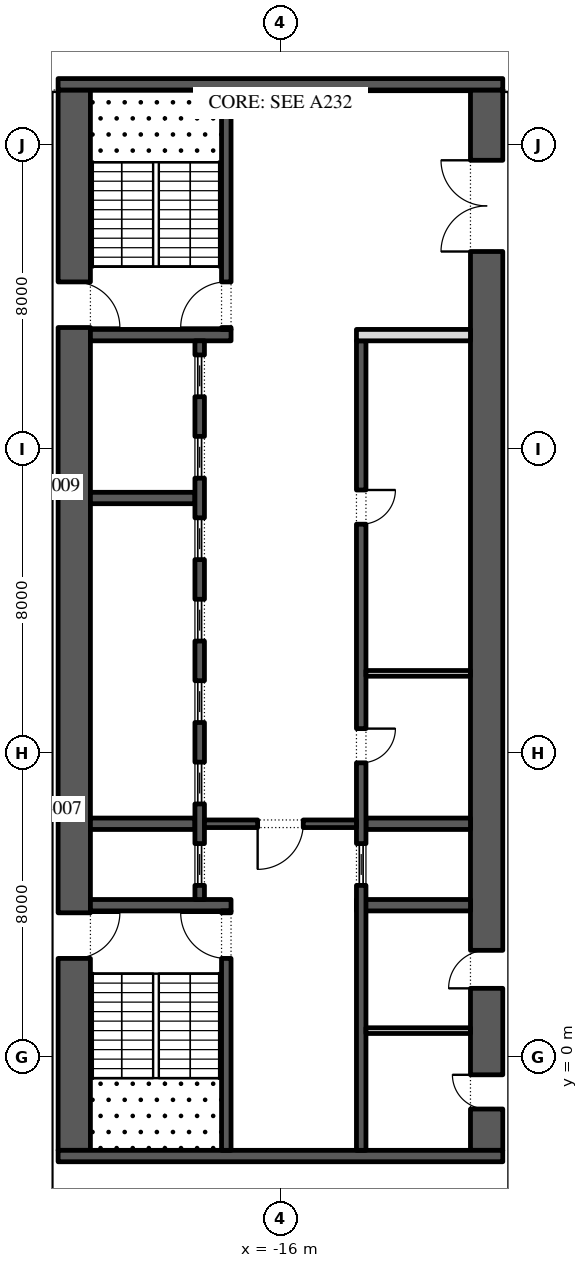
"""IFC4 building model, lengths in metres.
Left out: names, types, materials, properties, quantities, classifications, styles, units other than length and angle.
Written with IfcOpenShell. Run it as: python <this file> out.ifc"""

import sys

from ifc_helpers import new_model, si_unit, direction, frame, frame_2d, origin, place, context, subcontext, project, spatial, rectangle, extrude, element, fill, save


model = new_model("IFC4")
c1 = context("Model", 3, precision=1e-05, world=origin(), true_north=direction((0.0, 1.0)))
c2 = subcontext(c1, "Body", "Model", "MODEL_VIEW")
j1 = project(units=[si_unit("LENGTHUNIT", "METRE"), si_unit("PLANEANGLEUNIT", "RADIAN")], contexts=[c1])
p1 = place(None, origin())
s1 = spatial("IfcSite", under=j1, at=p1, CompositionType="ELEMENT")
p2 = place(p1, origin())
s2 = spatial("IfcBuilding", under=s1, at=p2, CompositionType="ELEMENT")
p3 = place(p2, frame((0.0, 0.0, 135.0)))
s3 = spatial("IfcBuildingStorey", under=s2, at=p3, CompositionType="ELEMENT", Elevation=135.0)
p4 = place(p3, frame((-21.425, -2.45, 0.0), z_axis=(0.0, 0.0, 1.0), x_axis=(0.0, 1.0, 0.0)))
e1 = element("IfcWall", 1, at=p4, inside=s3, PredefinedType="SHEAR", context=c2, shape_type="SweptSolid", body=[
    extrude(rectangle(XDim=27.9, YDim=0.85, at=frame_2d((13.95, 0.0))), origin(), (0.0, 0.0, 1.0), 4.0),
])
p5 = place(p4, frame((5.05, 0.0, 0.0)))
e2 = element("IfcOpeningElement", 2, at=p5, cuts=e1, PredefinedType="OPENING", context=c2, shape_type="SweptSolid", body=[
    extrude(rectangle(XDim=1.2, YDim=2.1, at=frame_2d((0.6, 1.05))), frame((0.0, 0.435, 0.0), z_axis=(0.0, -1.0, 0.0), x_axis=(1.0, 0.0, 0.0)), (0.0, 0.0, 1.0), 0.87),
])
p6 = place(p4, frame((21.65, 0.0, 0.0)))
e3 = element("IfcOpeningElement", 3, at=p6, cuts=e1, PredefinedType="OPENING", context=c2, shape_type="SweptSolid", body=[
    extrude(rectangle(XDim=1.2, YDim=2.1, at=frame_2d((0.6, 1.05))), frame((0.0, 0.435, 0.0), z_axis=(0.0, -1.0, 0.0), x_axis=(1.0, 0.0, 0.0)), (0.0, 0.0, 1.0), 0.87),
])
p7 = place(p3, frame((-10.575, -2.45, 0.0), z_axis=(0.0, 0.0, 1.0), x_axis=(0.0, 1.0, 0.0)))
e4 = element("IfcWall", 4, at=p7, inside=s3, PredefinedType="SHEAR", context=c2, shape_type="SweptSolid", body=[
    extrude(rectangle(XDim=27.9, YDim=0.85, at=frame_2d((13.95, 0.0))), origin(), (0.0, 0.0, 1.0), 4.0),
])
p8 = place(p7, frame((23.65, 0.0, 0.0)))
e5 = element("IfcOpeningElement", 5, at=p8, cuts=e4, PredefinedType="OPENING", context=c2, shape_type="SweptSolid", body=[
    extrude(rectangle(XDim=2.4, YDim=2.1, at=frame_2d((1.2, 1.05))), frame((0.0, 0.435, 0.0), z_axis=(0.0, -1.0, 0.0), x_axis=(1.0, 0.0, 0.0)), (0.0, 0.0, 1.0), 0.87),
])
p9 = place(p7, frame((1.087, 0.0, 0.0)))
e6 = element("IfcOpeningElement", 6, at=p9, cuts=e4, PredefinedType="OPENING", context=c2, shape_type="SweptSolid", body=[
    extrude(rectangle(XDim=0.9, YDim=2.1, at=frame_2d((0.45, 1.05))), frame((0.0, 0.435, 0.0), z_axis=(0.0, -1.0, 0.0), x_axis=(1.0, 0.0, 0.0)), (0.0, 0.0, 1.0), 0.87),
])
p10 = place(p7, frame((4.262, 0.0, 0.0)))
e7 = element("IfcOpeningElement", 7, at=p10, cuts=e4, PredefinedType="OPENING", context=c2, shape_type="SweptSolid", body=[
    extrude(rectangle(XDim=1.0, YDim=2.1, at=frame_2d((0.5, 1.05))), frame((0.0, 0.435, 0.0), z_axis=(0.0, -1.0, 0.0), x_axis=(1.0, 0.0, 0.0)), (0.0, 0.0, 1.0), 0.87),
])
for number, where, z_axis, x_axis in (
    (8, (-21.85, -2.6, 0.0), (0.0, 0.0, 1.0), (1.0, 0.0, 0.0)),
    (9, (-21.85, 25.6, 0.0), (0.0, 0.0, 1.0), (1.0, 0.0, 0.0)),
):
    element("IfcWall", number, at=place(p3, frame(where, z_axis=z_axis, x_axis=x_axis)), inside=s3, PredefinedType="SHEAR", context=c2, shape_type="SweptSolid", body=[
        extrude(rectangle(XDim=11.7, YDim=0.3, at=frame_2d((5.85, 0.0))), origin(), (0.0, 0.0, 1.0), 4.0),
    ])
p11 = place(p3, frame((-21.0, 4.0, 0.0), z_axis=(0.0, 0.0, 1.0), x_axis=(1.0, 0.0, 0.0)))
e10 = element("IfcWall", 10, at=p11, inside=s3, PredefinedType="SHEAR", context=c2, shape_type="SweptSolid", body=[
    extrude(rectangle(XDim=3.7, YDim=0.3, at=frame_2d((1.85, 0.0))), origin(), (0.0, 0.0, 1.0), 4.0),
])
p12 = place(p3, frame((-17.425, -2.45, 0.0), z_axis=(0.0, 0.0, 1.0), x_axis=(0.0, 1.0, 0.0)))
e11 = element("IfcWall", 11, at=p12, inside=s3, PredefinedType="SHEAR", context=c2, shape_type="SweptSolid", body=[
    extrude(rectangle(XDim=6.3, YDim=0.25, at=frame_2d((3.15, 0.0))), origin(), (0.0, 0.0, 1.0), 4.0),
])
p13 = place(p12, frame((5.05, 0.0, 0.0)))
e12 = element("IfcOpeningElement", 12, at=p13, cuts=e11, PredefinedType="OPENING", context=c2, shape_type="SweptSolid", body=[
    extrude(rectangle(XDim=1.2, YDim=2.1, at=frame_2d((0.6, 1.05))), frame((0.0, 0.135, 0.0), z_axis=(0.0, -1.0, 0.0), x_axis=(1.0, 0.0, 0.0)), (0.0, 0.0, 1.0), 0.27),
])
p14 = place(p3, frame((-21.0, 19.0, 0.0), z_axis=(0.0, 0.0, 1.0), x_axis=(1.0, 0.0, 0.0)))
e13 = element("IfcWall", 13, at=p14, inside=s3, PredefinedType="SHEAR", context=c2, shape_type="SweptSolid", body=[
    extrude(rectangle(XDim=3.7, YDim=0.3, at=frame_2d((1.85, 0.0))), origin(), (0.0, 0.0, 1.0), 4.0),
])
p15 = place(p3, frame((-17.425, 19.15, 0.0), z_axis=(0.0, 0.0, 1.0), x_axis=(0.0, 1.0, 0.0)))
e14 = element("IfcWall", 14, at=p15, inside=s3, PredefinedType="SHEAR", context=c2, shape_type="SweptSolid", body=[
    extrude(rectangle(XDim=6.3, YDim=0.25, at=frame_2d((3.15, 0.0))), origin(), (0.0, 0.0, 1.0), 4.0),
])
p16 = place(p15, frame((0.05, 0.0, 0.0)))
e15 = element("IfcOpeningElement", 15, at=p16, cuts=e14, PredefinedType="OPENING", context=c2, shape_type="SweptSolid", body=[
    extrude(rectangle(XDim=1.2, YDim=2.1, at=frame_2d((0.6, 1.05))), frame((0.0, 0.135, 0.0), z_axis=(0.0, -1.0, 0.0), x_axis=(1.0, 0.0, 0.0)), (0.0, 0.0, 1.0), 0.27),
])
for number, where, z_axis, x_axis in (
    (16, (-21.0, 6.143, 0.0), (0.0, 0.0, 1.0), (1.0, 0.0, 0.0)),
    (17, (-21.0, 14.714, 0.0), (0.0, 0.0, 1.0), (1.0, 0.0, 0.0)),
):
    element("IfcWall", number, at=place(p3, frame(where, z_axis=z_axis, x_axis=x_axis)), inside=s3, PredefinedType="SHEAR", context=c2, shape_type="SweptSolid", body=[
        extrude(rectangle(XDim=2.75, YDim=0.3, at=frame_2d((1.375, 0.0))), origin(), (0.0, 0.0, 1.0), 4.0),
    ])
p17 = place(p3, frame((-18.125, 4.15, 0.0), z_axis=(0.0, 0.0, 1.0), x_axis=(0.0, 1.0, 0.0)))
e18 = element("IfcWall", 18, at=p17, inside=s3, PredefinedType="SHEAR", context=c2, shape_type="SweptSolid", body=[
    extrude(rectangle(XDim=14.7, YDim=0.25, at=frame_2d((7.35, 0.0))), origin(), (0.0, 0.0, 1.0), 4.0),
])
p18 = place(p17, frame((0.371, 0.0, 0.0)))
e19 = element("IfcOpeningElement", 19, at=p18, cuts=e18, PredefinedType="OPENING", context=c2, shape_type="SweptSolid", body=[
    extrude(rectangle(XDim=1.1, YDim=2.1, at=frame_2d((0.55, 1.05))), frame((0.0, 0.135, 0.0), z_axis=(0.0, -1.0, 0.0), x_axis=(1.0, 0.0, 0.0)), (0.0, 0.0, 1.0), 0.27),
])
p19 = place(p17, frame((2.514, 0.0, 0.0)))
e20 = element("IfcOpeningElement", 20, at=p19, cuts=e18, PredefinedType="OPENING", context=c2, shape_type="SweptSolid", body=[
    extrude(rectangle(XDim=1.1, YDim=2.1, at=frame_2d((0.55, 1.05))), frame((0.0, 0.135, 0.0), z_axis=(0.0, -1.0, 0.0), x_axis=(1.0, 0.0, 0.0)), (0.0, 0.0, 1.0), 0.27),
])
p20 = place(p17, frame((4.657, 0.0, 0.0)))
e21 = element("IfcOpeningElement", 21, at=p20, cuts=e18, PredefinedType="OPENING", context=c2, shape_type="SweptSolid", body=[
    extrude(rectangle(XDim=1.1, YDim=2.1, at=frame_2d((0.55, 1.05))), frame((0.0, 0.135, 0.0), z_axis=(0.0, -1.0, 0.0), x_axis=(1.0, 0.0, 0.0)), (0.0, 0.0, 1.0), 0.27),
])
p21 = place(p17, frame((6.8, 0.0, 0.0)))
e22 = element("IfcOpeningElement", 22, at=p21, cuts=e18, PredefinedType="OPENING", context=c2, shape_type="SweptSolid", body=[
    extrude(rectangle(XDim=1.1, YDim=2.1, at=frame_2d((0.55, 1.05))), frame((0.0, 0.135, 0.0), z_axis=(0.0, -1.0, 0.0), x_axis=(1.0, 0.0, 0.0)), (0.0, 0.0, 1.0), 0.27),
])
p22 = place(p17, frame((8.943, 0.0, 0.0)))
e23 = element("IfcOpeningElement", 23, at=p22, cuts=e18, PredefinedType="OPENING", context=c2, shape_type="SweptSolid", body=[
    extrude(rectangle(XDim=1.1, YDim=2.1, at=frame_2d((0.55, 1.05))), frame((0.0, 0.135, 0.0), z_axis=(0.0, -1.0, 0.0), x_axis=(1.0, 0.0, 0.0)), (0.0, 0.0, 1.0), 0.27),
])
p23 = place(p17, frame((11.086, 0.0, 0.0)))
e24 = element("IfcOpeningElement", 24, at=p23, cuts=e18, PredefinedType="OPENING", context=c2, shape_type="SweptSolid", body=[
    extrude(rectangle(XDim=1.1, YDim=2.1, at=frame_2d((0.55, 1.05))), frame((0.0, 0.135, 0.0), z_axis=(0.0, -1.0, 0.0), x_axis=(1.0, 0.0, 0.0)), (0.0, 0.0, 1.0), 0.27),
])
p24 = place(p17, frame((13.229, 0.0, 0.0)))
e25 = element("IfcOpeningElement", 25, at=p24, cuts=e18, PredefinedType="OPENING", context=c2, shape_type="SweptSolid", body=[
    extrude(rectangle(XDim=1.1, YDim=2.1, at=frame_2d((0.55, 1.05))), frame((0.0, 0.135, 0.0), z_axis=(0.0, -1.0, 0.0), x_axis=(1.0, 0.0, 0.0)), (0.0, 0.0, 1.0), 0.27),
])
p25 = place(p3, frame((-14.0, 4.0, 0.0), z_axis=(0.0, 0.0, 1.0), x_axis=(1.0, 0.0, 0.0)))
e26 = element("IfcWall", 26, at=p25, inside=s3, PredefinedType="SHEAR", context=c2, shape_type="SweptSolid", body=[
    extrude(rectangle(XDim=3.0, YDim=0.3, at=frame_2d((1.5, 0.0))), origin(), (0.0, 0.0, 1.0), 4.0),
])
p26 = place(p3, frame((-13.75, 6.143, 0.0), z_axis=(0.0, 0.0, 1.0), x_axis=(1.0, 0.0, 0.0)))
e27 = element("IfcWall", 27, at=p26, inside=s3, PredefinedType="SHEAR", context=c2, shape_type="SweptSolid", body=[
    extrude(rectangle(XDim=2.75, YDim=0.3, at=frame_2d((1.375, 0.0))), origin(), (0.0, 0.0, 1.0), 4.0),
])
p27 = place(p3, frame((-13.875, -2.45, 0.0), z_axis=(0.0, 0.0, 1.0), x_axis=(0.0, 1.0, 0.0)))
e28 = element("IfcWall", 28, at=p27, inside=s3, PredefinedType="SHEAR", context=c2, shape_type="SweptSolid", body=[
    extrude(rectangle(XDim=21.3, YDim=0.25, at=frame_2d((10.65, 0.0))), origin(), (0.0, 0.0, 1.0), 4.0),
])
p28 = place(p27, frame((10.196, 0.0, 0.0)))
e29 = element("IfcOpeningElement", 29, at=p28, cuts=e28, PredefinedType="OPENING", context=c2, shape_type="SweptSolid", body=[
    extrude(rectangle(XDim=0.9, YDim=2.1, at=frame_2d((0.45, 1.05))), frame((0.0, 0.135, 0.0), z_axis=(0.0, -1.0, 0.0), x_axis=(1.0, 0.0, 0.0)), (0.0, 0.0, 1.0), 0.27),
])
p29 = place(p27, frame((16.475, 0.0, 0.0)))
e30 = element("IfcOpeningElement", 30, at=p29, cuts=e28, PredefinedType="OPENING", context=c2, shape_type="SweptSolid", body=[
    extrude(rectangle(XDim=0.9, YDim=2.1, at=frame_2d((0.45, 1.05))), frame((0.0, 0.135, 0.0), z_axis=(0.0, -1.0, 0.0), x_axis=(1.0, 0.0, 0.0)), (0.0, 0.0, 1.0), 0.27),
])
p30 = place(p27, frame((6.971, 0.0, 0.0)))
e31 = element("IfcOpeningElement", 31, at=p30, cuts=e28, PredefinedType="OPENING", context=c2, shape_type="SweptSolid", body=[
    extrude(rectangle(XDim=1.1, YDim=2.1, at=frame_2d((0.55, 1.05))), frame((0.0, 0.135, 0.0), z_axis=(0.0, -1.0, 0.0), x_axis=(1.0, 0.0, 0.0)), (0.0, 0.0, 1.0), 0.27),
])
p31 = place(p3, frame((-14.0, 19.0, 0.0), z_axis=(0.0, 0.0, 1.0), x_axis=(1.0, 0.0, 0.0)))
e32 = element("IfcWall", 32, at=p31, inside=s3, PredefinedType="PARTITIONING", context=c2, shape_type="SweptSolid", body=[
    extrude(rectangle(XDim=3.0, YDim=0.3, at=frame_2d((1.5, 0.0))), origin(), (0.0, 0.0, 1.0), 4.0),
])
p32 = place(p3, frame((-13.75, 10.1, 0.0), z_axis=(0.0, 0.0, 1.0), x_axis=(1.0, 0.0, 0.0)))
e33 = element("IfcWall", 33, at=p32, inside=s3, PredefinedType="PARTITIONING", context=c2, shape_type="SweptSolid", body=[
    extrude(rectangle(XDim=2.75, YDim=0.15, at=frame_2d((1.375, 0.0))), origin(), (0.0, 0.0, 1.0), 4.0),
])
p33 = place(p3, frame((-18.0, 6.143, 0.0), z_axis=(0.0, 0.0, 1.0), x_axis=(1.0, 0.0, 0.0)))
e34 = element("IfcWall", 34, at=p33, inside=s3, PredefinedType="SHEAR", context=c2, shape_type="SweptSolid", body=[
    extrude(rectangle(XDim=4.0, YDim=0.2, at=frame_2d((2.0, 0.0))), origin(), (0.0, 0.0, 1.0), 4.0),
])
p34 = place(p33, frame((1.4, 0.0, 0.0)))
e35 = element("IfcOpeningElement", 35, at=p34, cuts=e34, PredefinedType="OPENING", context=c2, shape_type="SweptSolid", body=[
    extrude(rectangle(XDim=1.2, YDim=2.1, at=frame_2d((0.6, 1.05))), frame((0.0, 0.11, 0.0), z_axis=(0.0, -1.0, 0.0), x_axis=(1.0, 0.0, 0.0)), (0.0, 0.0, 1.0), 0.22),
])
p35 = place(p3, frame((-13.75, 0.7, 0.0), z_axis=(0.0, 0.0, 1.0), x_axis=(1.0, 0.0, 0.0)))
e36 = element("IfcWall", 36, at=p35, inside=s3, PredefinedType="PARTITIONING", context=c2, shape_type="SweptSolid", body=[
    extrude(rectangle(XDim=2.75, YDim=0.15, at=frame_2d((1.375, 0.0))), origin(), (0.0, 0.0, 1.0), 4.0),
])
p36 = place(p18, origin())
e37 = element("IfcDoor", 37, at=p36, inside=s3, OperationType="SLIDING_TO_LEFT", PredefinedType="DOOR", context=c2, shape_type="SweptSolid", body=[
    extrude(rectangle(XDim=1.1, YDim=2.1, at=frame_2d((0.55, 1.05))), frame((0.0, 0.025, 0.0), z_axis=(0.0, -1.0, 0.0), x_axis=(1.0, 0.0, 0.0)), (0.0, 0.0, 1.0), 0.05),
])
fill(e19, e37)
p37 = place(p19, origin())
e38 = element("IfcDoor", 38, at=p37, inside=s3, OperationType="SLIDING_TO_LEFT", PredefinedType="DOOR", context=c2, shape_type="SweptSolid", body=[
    extrude(rectangle(XDim=1.1, YDim=2.1, at=frame_2d((0.55, 1.05))), frame((0.0, 0.025, 0.0), z_axis=(0.0, -1.0, 0.0), x_axis=(1.0, 0.0, 0.0)), (0.0, 0.0, 1.0), 0.05),
])
fill(e20, e38)
p38 = place(p20, origin())
e39 = element("IfcDoor", 39, at=p38, inside=s3, OperationType="SLIDING_TO_LEFT", PredefinedType="DOOR", context=c2, shape_type="SweptSolid", body=[
    extrude(rectangle(XDim=1.1, YDim=2.1, at=frame_2d((0.55, 1.05))), frame((0.0, 0.025, 0.0), z_axis=(0.0, -1.0, 0.0), x_axis=(1.0, 0.0, 0.0)), (0.0, 0.0, 1.0), 0.05),
])
fill(e21, e39)
p39 = place(p21, origin())
e40 = element("IfcDoor", 40, at=p39, inside=s3, OperationType="SLIDING_TO_LEFT", PredefinedType="DOOR", context=c2, shape_type="SweptSolid", body=[
    extrude(rectangle(XDim=1.1, YDim=2.1, at=frame_2d((0.55, 1.05))), frame((0.0, 0.025, 0.0), z_axis=(0.0, -1.0, 0.0), x_axis=(1.0, 0.0, 0.0)), (0.0, 0.0, 1.0), 0.05),
])
fill(e22, e40)
p40 = place(p22, origin())
e41 = element("IfcDoor", 41, at=p40, inside=s3, OperationType="SLIDING_TO_LEFT", PredefinedType="DOOR", context=c2, shape_type="SweptSolid", body=[
    extrude(rectangle(XDim=1.1, YDim=2.1, at=frame_2d((0.55, 1.05))), frame((0.0, 0.025, 0.0), z_axis=(0.0, -1.0, 0.0), x_axis=(1.0, 0.0, 0.0)), (0.0, 0.0, 1.0), 0.05),
])
fill(e23, e41)
p41 = place(p23, origin())
e42 = element("IfcDoor", 42, at=p41, inside=s3, OperationType="SLIDING_TO_LEFT", PredefinedType="DOOR", context=c2, shape_type="SweptSolid", body=[
    extrude(rectangle(XDim=1.1, YDim=2.1, at=frame_2d((0.55, 1.05))), frame((0.0, 0.025, 0.0), z_axis=(0.0, -1.0, 0.0), x_axis=(1.0, 0.0, 0.0)), (0.0, 0.0, 1.0), 0.05),
])
fill(e24, e42)
p42 = place(p24, origin())
e43 = element("IfcDoor", 43, at=p42, inside=s3, OperationType="SLIDING_TO_LEFT", PredefinedType="DOOR", context=c2, shape_type="SweptSolid", body=[
    extrude(rectangle(XDim=1.1, YDim=2.1, at=frame_2d((0.55, 1.05))), frame((0.0, 0.025, 0.0), z_axis=(0.0, -1.0, 0.0), x_axis=(1.0, 0.0, 0.0)), (0.0, 0.0, 1.0), 0.05),
])
fill(e25, e43)
p43 = place(p28, frame((0.9, -0.2, 0.0), z_axis=(0.0, 0.0, 1.0), x_axis=(-1.0, 0.0, 0.0)))
e44 = element("IfcDoor", 44, at=p43, inside=s3, OperationType="SINGLE_SWING_RIGHT", PredefinedType="DOOR", context=c2, shape_type="SweptSolid", body=[
    extrude(rectangle(XDim=0.9, YDim=2.1, at=frame_2d((0.45, 1.05))), frame((0.0, -0.075, 0.0), z_axis=(0.0, -1.0, 0.0), x_axis=(1.0, 0.0, 0.0)), (0.0, 0.0, 1.0), 0.05),
])
fill(e29, e44)
p44 = place(p29, frame((0.9, -0.2, 0.0), z_axis=(0.0, 0.0, 1.0), x_axis=(-1.0, 0.0, 0.0)))
e45 = element("IfcDoor", 45, at=p44, inside=s3, OperationType="SINGLE_SWING_RIGHT", PredefinedType="DOOR", context=c2, shape_type="SweptSolid", body=[
    extrude(rectangle(XDim=0.9, YDim=2.1, at=frame_2d((0.45, 1.05))), frame((0.0, -0.075, 0.0), z_axis=(0.0, -1.0, 0.0), x_axis=(1.0, 0.0, 0.0)), (0.0, 0.0, 1.0), 0.05),
])
fill(e30, e45)
p45 = place(p30, origin())
e46 = element("IfcDoor", 46, at=p45, inside=s3, OperationType="SLIDING_TO_LEFT", PredefinedType="DOOR", context=c2, shape_type="SweptSolid", body=[
    extrude(rectangle(XDim=1.1, YDim=2.1, at=frame_2d((0.55, 1.05))), frame((0.0, 0.025, 0.0), z_axis=(0.0, -1.0, 0.0), x_axis=(1.0, 0.0, 0.0)), (0.0, 0.0, 1.0), 0.05),
])
fill(e31, e46)
p46 = place(p34, frame((1.2, 0.0, 0.0), z_axis=(0.0, 0.0, 1.0), x_axis=(-1.0, 0.0, 0.0)))
e47 = element("IfcDoor", 47, at=p46, inside=s3, OperationType="SINGLE_SWING_LEFT", PredefinedType="DOOR", context=c2, shape_type="SweptSolid", body=[
    extrude(rectangle(XDim=1.2, YDim=2.1, at=frame_2d((0.6, 1.05))), frame((0.0, 0.025, 0.0), z_axis=(0.0, -1.0, 0.0), x_axis=(1.0, 0.0, 0.0)), (0.0, 0.0, 1.0), 0.05),
])
fill(e35, e47)
p47 = place(p8, origin())
e48 = element("IfcDoor", 48, at=p47, inside=s3, OperationType="DOUBLE_DOOR_SINGLE_SWING", PredefinedType="DOOR", context=c2, shape_type="SweptSolid", body=[
    extrude(rectangle(XDim=2.4, YDim=2.1, at=frame_2d((1.2, 1.05))), frame((0.0, 0.025, 0.0), z_axis=(0.0, -1.0, 0.0), x_axis=(1.0, 0.0, 0.0)), (0.0, 0.0, 1.0), 0.05),
])
fill(e5, e48)
p48 = place(p13, origin())
e49 = element("IfcDoor", 49, at=p48, inside=s3, OperationType="SINGLE_SWING_LEFT", PredefinedType="DOOR", context=c2, shape_type="SweptSolid", body=[
    extrude(rectangle(XDim=1.2, YDim=2.1, at=frame_2d((0.6, 1.05))), frame((0.0, 0.025, 0.0), z_axis=(0.0, -1.0, 0.0), x_axis=(1.0, 0.0, 0.0)), (0.0, 0.0, 1.0), 0.05),
])
fill(e12, e49)
p49 = place(p5, frame((1.2, 0.0, 0.0), z_axis=(0.0, 0.0, 1.0), x_axis=(-1.0, 0.0, 0.0)))
e50 = element("IfcDoor", 50, at=p49, inside=s3, OperationType="SINGLE_SWING_RIGHT", PredefinedType="DOOR", context=c2, shape_type="SweptSolid", body=[
    extrude(rectangle(XDim=1.2, YDim=2.1, at=frame_2d((0.6, 1.05))), frame((0.0, 0.025, 0.0), z_axis=(0.0, -1.0, 0.0), x_axis=(1.0, 0.0, 0.0)), (0.0, 0.0, 1.0), 0.05),
])
fill(e2, e50)
p50 = place(p16, origin())
e51 = element("IfcDoor", 51, at=p50, inside=s3, OperationType="SINGLE_SWING_RIGHT", PredefinedType="DOOR", context=c2, shape_type="SweptSolid", body=[
    extrude(rectangle(XDim=1.2, YDim=2.1, at=frame_2d((0.6, 1.05))), frame((0.0, 0.025, 0.0), z_axis=(0.0, -1.0, 0.0), x_axis=(1.0, 0.0, 0.0)), (0.0, 0.0, 1.0), 0.05),
])
fill(e15, e51)
p51 = place(p6, frame((1.2, 0.0, 0.0), z_axis=(0.0, 0.0, 1.0), x_axis=(-1.0, 0.0, 0.0)))
e52 = element("IfcDoor", 52, at=p51, inside=s3, OperationType="SINGLE_SWING_LEFT", PredefinedType="DOOR", context=c2, shape_type="SweptSolid", body=[
    extrude(rectangle(XDim=1.2, YDim=2.1, at=frame_2d((0.6, 1.05))), frame((0.0, 0.025, 0.0), z_axis=(0.0, -1.0, 0.0), x_axis=(1.0, 0.0, 0.0)), (0.0, 0.0, 1.0), 0.05),
])
fill(e3, e52)
p52 = place(p9, origin())
e53 = element("IfcDoor", 53, at=p52, inside=s3, OperationType="SINGLE_SWING_LEFT", PredefinedType="DOOR", context=c2, shape_type="SweptSolid", body=[
    extrude(rectangle(XDim=0.9, YDim=2.1, at=frame_2d((0.45, 1.05))), frame((0.0, 0.425, 0.0), z_axis=(0.0, -1.0, 0.0), x_axis=(1.0, 0.0, 0.0)), (0.0, 0.0, 1.0), 0.05),
])
fill(e6, e53)
p53 = place(p10, origin())
e54 = element("IfcDoor", 54, at=p53, inside=s3, OperationType="SINGLE_SWING_RIGHT", PredefinedType="DOOR", context=c2, shape_type="SweptSolid", body=[
    extrude(rectangle(XDim=1.0, YDim=2.1, at=frame_2d((0.5, 1.05))), frame((0.0, 0.425, 0.0), z_axis=(0.0, -1.0, 0.0), x_axis=(1.0, 0.0, 0.0)), (0.0, 0.0, 1.0), 0.05),
])
fill(e7, e54)
save(model, sys.argv[1])
